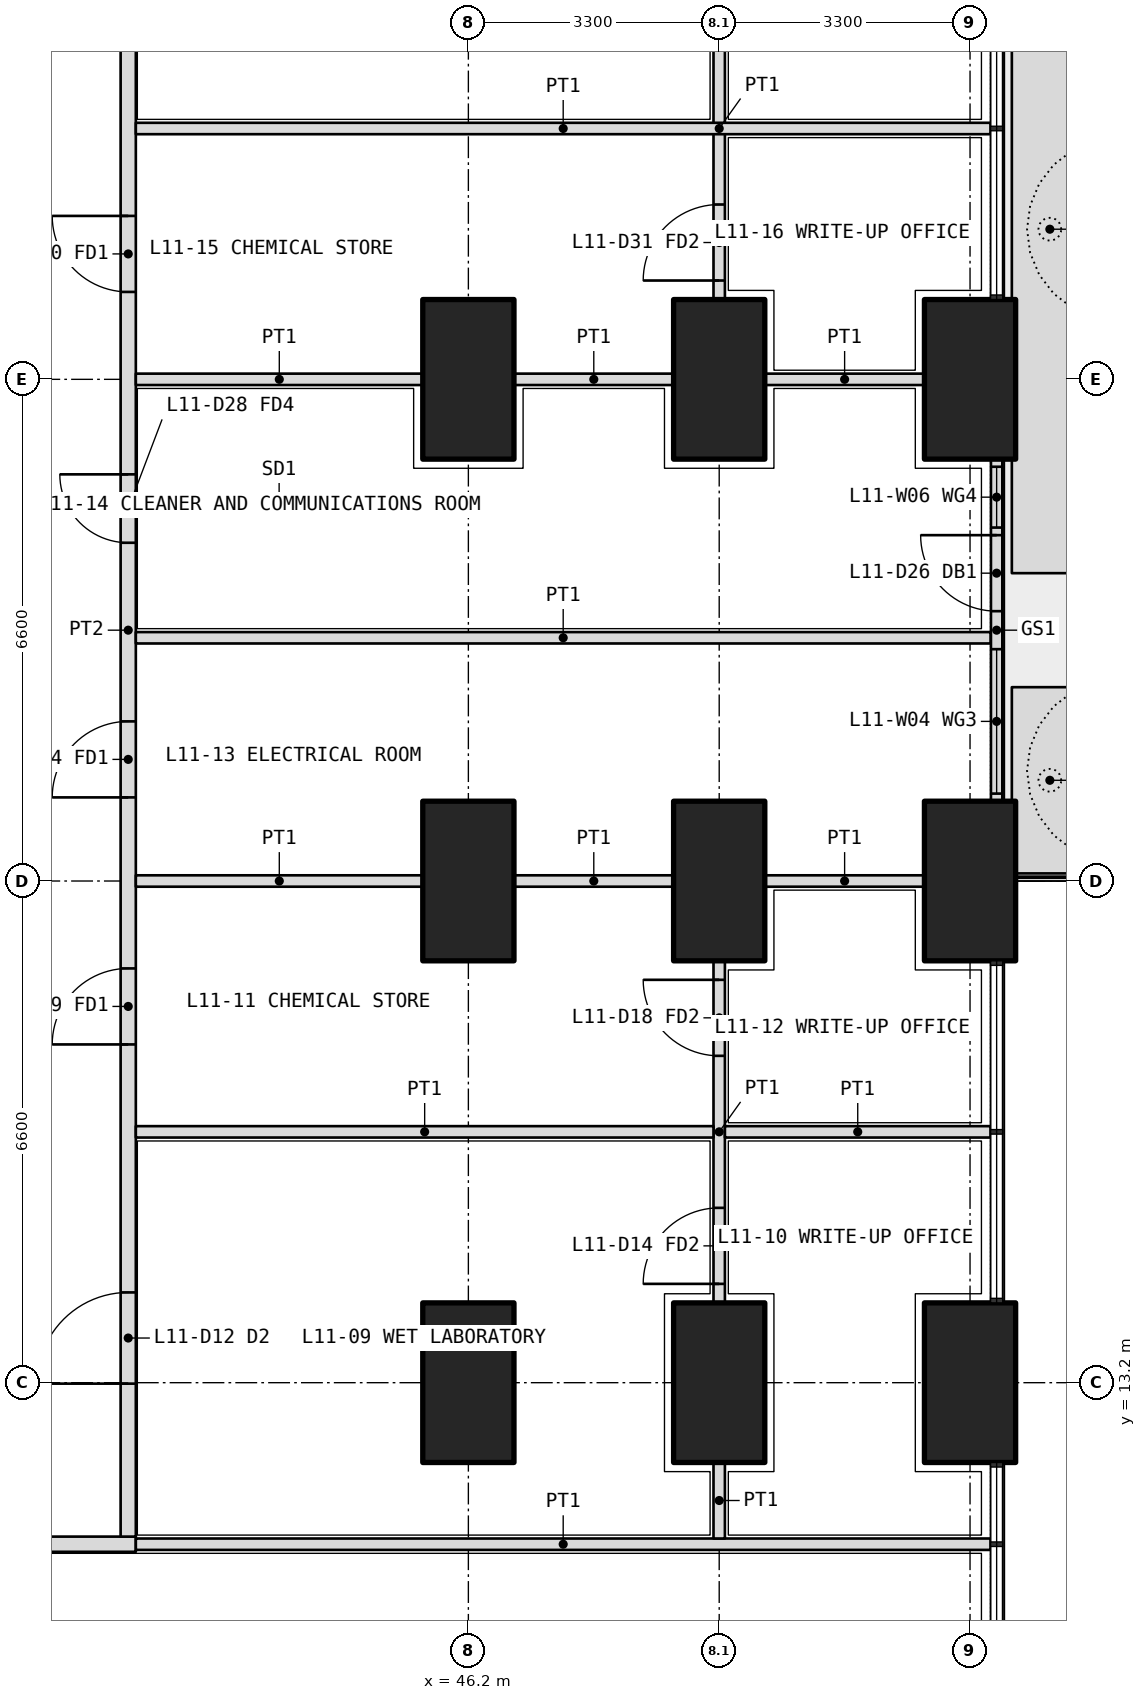
"""IFC4 building model, lengths in metres.
Left out: names, types, materials, properties, quantities, classifications, styles, units other than length and angle.
Written with IfcOpenShell. Run it as: python <this file> out.ifc"""

import sys

from ifc_helpers import new_model, si_unit, direction, frame, frame_2d, origin, origin_2d, place, context, subcontext, project, spatial, polyline, rectangle, outline, extrude, element, fill, save


model = new_model("IFC4")
c1 = context("Model", 3, precision=1e-05, world=origin(), true_north=direction((0.0, 1.0)))
c2 = subcontext(c1, "Body", "Model", "MODEL_VIEW")
j1 = project(units=[si_unit("LENGTHUNIT", "METRE"), si_unit("PLANEANGLEUNIT", "RADIAN")], contexts=[c1])
p1 = place(None, origin())
s1 = spatial("IfcSite", under=j1, at=p1, CompositionType="ELEMENT")
p2 = place(p1, origin())
s2 = spatial("IfcBuilding", under=s1, at=p2, CompositionType="ELEMENT")
p3 = place(p2, frame((0.0, 0.0, 50.7)))
s3 = spatial("IfcBuildingStorey", under=s2, at=p3, CompositionType="ELEMENT", Elevation=50.7)
for number, where, z_axis, x_axis in (
    (1, (52.8, 13.2, 0.0), (0.0, 0.0, 1.0), (0.0, 1.0, 0.0)),
    (2, (52.8, 19.8, 0.0), (0.0, 0.0, 1.0), (0.0, 1.0, 0.0)),
    (3, (52.8, 26.4, 0.0), (0.0, 0.0, 1.0), (0.0, 1.0, 0.0)),
    (4, (49.5, 13.2, 0.0), (0.0, 0.0, 1.0), (0.0, 1.0, 0.0)),
    (5, (49.5, 19.8, 0.0), (0.0, 0.0, 1.0), (0.0, 1.0, 0.0)),
    (6, (49.5, 26.4, 0.0), (0.0, 0.0, 1.0), (0.0, 1.0, 0.0)),
    (7, (46.2, 13.2, 0.0), (0.0, 0.0, 1.0), (0.0, 1.0, 0.0)),
    (8, (46.2, 19.8, 0.0), (0.0, 0.0, 1.0), (0.0, 1.0, 0.0)),
    (9, (46.2, 26.4, 0.0), (0.0, 0.0, 1.0), (0.0, 1.0, 0.0)),
):
    element("IfcColumn", number, at=place(p3, frame(where, z_axis=z_axis, x_axis=x_axis)), inside=s3, PredefinedType="COLUMN", context=c2, shape_type="SweptSolid", body=[
        extrude(rectangle(XDim=2.1, YDim=1.2, at=origin_2d()), origin(), (0.0, 0.0, 1.0), 4.2),
    ])
p4 = place(p3, origin())
e10 = element("IfcWall", 10, at=p4, inside=s3, PredefinedType="USERDEFINED", context=c2, shape_type="SweptSolid", body=[
    extrude(outline(polyline([(53.35, 19.9), (54.35, 19.9), (54.35, 22.35), (53.35, 22.35), (53.35, 19.9)]), holes=[polyline([(53.5, 20.05), (54.2, 20.05), (54.2, 22.2), (53.5, 22.2), (53.5, 20.05)])]), origin(), (0.0, 0.0, 1.0), 1.05),
])
p5 = place(p3, origin())
e11 = element("IfcWall", 11, at=p5, inside=s3, PredefinedType="USERDEFINED", context=c2, shape_type="SweptSolid", body=[
    extrude(outline(polyline([(53.35, 23.85), (54.35, 23.85), (54.35, 32.9), (53.35, 32.9), (53.35, 23.85)]), holes=[polyline([(53.5, 24.0), (54.2, 24.0), (54.2, 32.75), (53.5, 32.75), (53.5, 24.0)])]), origin(), (0.0, 0.0, 1.0), 1.05),
])
p6 = place(p3, frame((53.15, 20.85, 0.0), z_axis=(0.0, 0.0, 1.0), x_axis=(0.0, 1.0, 0.0)))
e12 = element("IfcWall", 12, at=p6, inside=s3, PredefinedType="SOLIDWALL", context=c2, shape_type="SweptSolid", body=[
    extrude(rectangle(XDim=4.5, YDim=0.15, at=frame_2d((2.25, 0.0))), origin(), (0.0, 0.0, 1.0), 2.7),
])
p7 = place(p6, frame((2.5, 0.0, 0.0)))
e13 = element("IfcOpeningElement", 13, at=p7, cuts=e12, PredefinedType="OPENING", context=c2, shape_type="SweptSolid", body=[
    extrude(rectangle(XDim=1.0, YDim=2.4, at=frame_2d((0.5, 1.2))), frame((0.0, 0.085, 0.0), z_axis=(0.0, -1.0, 0.0), x_axis=(1.0, 0.0, 0.0)), (0.0, 0.0, 1.0), 0.17),
])
p8 = place(p6, frame((0.1, 0.0, 0.1)))
e14 = element("IfcOpeningElement", 14, at=p8, cuts=e12, PredefinedType="OPENING", context=c2, shape_type="SweptSolid", body=[
    extrude(rectangle(XDim=1.9, YDim=2.3, at=frame_2d((0.95, 1.15))), frame((0.0, 0.085, 0.0), z_axis=(0.0, -1.0, 0.0), x_axis=(1.0, 0.0, 0.0)), (0.0, 0.0, 1.0), 0.17),
])
p9 = place(p6, frame((3.6, 0.0, 0.1)))
e15 = element("IfcOpeningElement", 15, at=p9, cuts=e12, PredefinedType="OPENING", context=c2, shape_type="SweptSolid", body=[
    extrude(rectangle(XDim=0.8, YDim=2.3, at=frame_2d((0.4, 1.15))), frame((0.0, 0.085, 0.0), z_axis=(0.0, -1.0, 0.0), x_axis=(1.0, 0.0, 0.0)), (0.0, 0.0, 1.0), 0.17),
])
p10 = place(p3, frame((26.4, 11.075, 0.0), z_axis=(0.0, 0.0, 1.0), x_axis=(1.0, 0.0, 0.0)))
e16 = element("IfcWall", 16, at=p10, inside=s3, PredefinedType="PARTITIONING", context=c2, shape_type="SweptSolid", body=[
    extrude(rectangle(XDim=15.425, YDim=0.2, at=frame_2d((7.712, 0.0))), origin(), (0.0, 0.0, 1.0), 2.85),
])
p11 = place(p10, frame((1.6, 0.0, 0.0)))
e17 = element("IfcOpeningElement", 17, at=p11, cuts=e16, PredefinedType="OPENING", context=c2, shape_type="SweptSolid", body=[
    extrude(rectangle(XDim=1.0, YDim=2.1, at=frame_2d((0.5, 1.05))), frame((0.0, 0.11, 0.0), z_axis=(0.0, -1.0, 0.0), x_axis=(1.0, 0.0, 0.0)), (0.0, 0.0, 1.0), 0.22),
])
p12 = place(p10, frame((4.9, 0.0, 0.0)))
e18 = element("IfcOpeningElement", 18, at=p12, cuts=e16, PredefinedType="OPENING", context=c2, shape_type="SweptSolid", body=[
    extrude(rectangle(XDim=1.0, YDim=2.1, at=frame_2d((0.5, 1.05))), frame((0.0, 0.11, 0.0), z_axis=(0.0, -1.0, 0.0), x_axis=(1.0, 0.0, 0.0)), (0.0, 0.0, 1.0), 0.22),
])
p13 = place(p10, frame((10.363, 0.0, 0.0)))
e19 = element("IfcOpeningElement", 19, at=p13, cuts=e16, PredefinedType="OPENING", context=c2, shape_type="SweptSolid", body=[
    extrude(rectangle(XDim=1.2, YDim=2.1, at=frame_2d((0.6, 1.05))), frame((0.0, 0.11, 0.0), z_axis=(0.0, -1.0, 0.0), x_axis=(1.0, 0.0, 0.0)), (0.0, 0.0, 1.0), 0.22),
])
p14 = place(p3, frame((41.725, 11.175, 0.0), z_axis=(0.0, 0.0, 1.0), x_axis=(0.0, 1.0, 0.0)))
e20 = element("IfcWall", 20, at=p14, inside=s3, PredefinedType="PARTITIONING", context=c2, shape_type="SweptSolid", body=[
    extrude(rectangle(XDim=23.85, YDim=0.2, at=frame_2d((11.925, 0.0))), origin(), (0.0, 0.0, 1.0), 2.85),
])
p15 = place(p14, frame((2.012, 0.0, 0.0)))
e21 = element("IfcOpeningElement", 21, at=p15, cuts=e20, PredefinedType="OPENING", context=c2, shape_type="SweptSolid", body=[
    extrude(rectangle(XDim=1.2, YDim=2.1, at=frame_2d((0.6, 1.05))), frame((0.0, 0.11, 0.0), z_axis=(0.0, -1.0, 0.0), x_axis=(1.0, 0.0, 0.0)), (0.0, 0.0, 1.0), 0.22),
])
p16 = place(p14, frame((6.475, 0.0, 0.0)))
e22 = element("IfcOpeningElement", 22, at=p16, cuts=e20, PredefinedType="OPENING", context=c2, shape_type="SweptSolid", body=[
    extrude(rectangle(XDim=1.0, YDim=2.1, at=frame_2d((0.5, 1.05))), frame((0.0, 0.11, 0.0), z_axis=(0.0, -1.0, 0.0), x_axis=(1.0, 0.0, 0.0)), (0.0, 0.0, 1.0), 0.22),
])
p17 = place(p14, frame((9.725, 0.0, 0.0)))
e23 = element("IfcOpeningElement", 23, at=p17, cuts=e20, PredefinedType="OPENING", context=c2, shape_type="SweptSolid", body=[
    extrude(rectangle(XDim=1.0, YDim=2.1, at=frame_2d((0.5, 1.05))), frame((0.0, 0.11, 0.0), z_axis=(0.0, -1.0, 0.0), x_axis=(1.0, 0.0, 0.0)), (0.0, 0.0, 1.0), 0.22),
])
p18 = place(p14, frame((13.075, 0.0, 0.0)))
e24 = element("IfcOpeningElement", 24, at=p18, cuts=e20, PredefinedType="OPENING", context=c2, shape_type="SweptSolid", body=[
    extrude(rectangle(XDim=0.9, YDim=2.1, at=frame_2d((0.45, 1.05))), frame((0.0, 0.11, 0.0), z_axis=(0.0, -1.0, 0.0), x_axis=(1.0, 0.0, 0.0)), (0.0, 0.0, 1.0), 0.22),
])
p19 = place(p14, frame((16.375, 0.0, 0.0)))
e25 = element("IfcOpeningElement", 25, at=p19, cuts=e20, PredefinedType="OPENING", context=c2, shape_type="SweptSolid", body=[
    extrude(rectangle(XDim=1.0, YDim=2.1, at=frame_2d((0.5, 1.05))), frame((0.0, 0.11, 0.0), z_axis=(0.0, -1.0, 0.0), x_axis=(1.0, 0.0, 0.0)), (0.0, 0.0, 1.0), 0.22),
])
p20 = place(p14, frame((20.738, 0.0, 0.0)))
e26 = element("IfcOpeningElement", 26, at=p20, cuts=e20, PredefinedType="OPENING", context=c2, shape_type="SweptSolid", body=[
    extrude(rectangle(XDim=1.0, YDim=2.1, at=frame_2d((0.5, 1.05))), frame((0.0, 0.11, 0.0), z_axis=(0.0, -1.0, 0.0), x_axis=(1.0, 0.0, 0.0)), (0.0, 0.0, 1.0), 0.22),
])
p21 = place(p3, frame((53.07, 11.075, 0.0), z_axis=(0.0, 0.0, 1.0), x_axis=(-1.0, 0.0, 0.0)))
e27 = element("IfcWall", 27, at=p21, inside=s3, PredefinedType="PARTITIONING", context=c2, shape_type="SweptSolid", body=[
    extrude(rectangle(XDim=11.245, YDim=0.15, at=frame_2d((5.623, 0.0))), origin(), (0.0, 0.0, 1.0), 2.7),
])
p22 = place(p3, frame((49.5, 11.15, 0.0), z_axis=(0.0, 0.0, 1.0), x_axis=(0.0, 1.0, 0.0)))
e28 = element("IfcWall", 28, at=p22, inside=s3, PredefinedType="PARTITIONING", context=c2, shape_type="SweptSolid", body=[
    extrude(rectangle(XDim=1.0, YDim=0.15, at=frame_2d((0.5, 0.0))), origin(), (0.0, 0.0, 1.0), 3.9),
])
p23 = place(p3, frame((49.5, 14.25, 0.0), z_axis=(0.0, 0.0, 1.0), x_axis=(0.0, 1.0, 0.0)))
e29 = element("IfcWall", 29, at=p23, inside=s3, PredefinedType="PARTITIONING", context=c2, shape_type="SweptSolid", body=[
    extrude(rectangle(XDim=4.5, YDim=0.15, at=frame_2d((2.25, 0.0))), origin(), (0.0, 0.0, 1.0), 3.9),
])
p24 = place(p23, frame((0.25, 0.0, 0.0)))
e30 = element("IfcOpeningElement", 30, at=p24, cuts=e29, PredefinedType="OPENING", context=c2, shape_type="SweptSolid", body=[
    extrude(rectangle(XDim=1.0, YDim=2.1, at=frame_2d((0.5, 1.05))), frame((0.0, 0.085, 0.0), z_axis=(0.0, -1.0, 0.0), x_axis=(1.0, 0.0, 0.0)), (0.0, 0.0, 1.0), 0.17),
])
p25 = place(p23, frame((3.25, 0.0, 0.0)))
e31 = element("IfcOpeningElement", 31, at=p25, cuts=e29, PredefinedType="OPENING", context=c2, shape_type="SweptSolid", body=[
    extrude(rectangle(XDim=1.0, YDim=2.1, at=frame_2d((0.5, 1.05))), frame((0.0, 0.085, 0.0), z_axis=(0.0, -1.0, 0.0), x_axis=(1.0, 0.0, 0.0)), (0.0, 0.0, 1.0), 0.17),
])
p26 = place(p3, frame((49.5, 27.45, 0.0), z_axis=(0.0, 0.0, 1.0), x_axis=(0.0, 1.0, 0.0)))
e32 = element("IfcWall", 32, at=p26, inside=s3, PredefinedType="PARTITIONING", context=c2, shape_type="SweptSolid", body=[
    extrude(rectangle(XDim=4.5, YDim=0.15, at=frame_2d((2.25, 0.0))), origin(), (0.0, 0.0, 1.0), 3.9),
])
p27 = place(p26, frame((0.25, 0.0, 0.0)))
e33 = element("IfcOpeningElement", 33, at=p27, cuts=e32, PredefinedType="OPENING", context=c2, shape_type="SweptSolid", body=[
    extrude(rectangle(XDim=1.0, YDim=2.1, at=frame_2d((0.5, 1.05))), frame((0.0, 0.085, 0.0), z_axis=(0.0, -1.0, 0.0), x_axis=(1.0, 0.0, 0.0)), (0.0, 0.0, 1.0), 0.17),
])
p28 = place(p3, frame((53.07, 23.0, 0.0), z_axis=(0.0, 0.0, 1.0), x_axis=(-1.0, 0.0, 0.0)))
e34 = element("IfcWall", 34, at=p28, inside=s3, PredefinedType="PARTITIONING", context=c2, shape_type="SweptSolid", body=[
    extrude(rectangle(XDim=11.245, YDim=0.15, at=frame_2d((5.623, 0.0))), origin(), (0.0, 0.0, 1.0), 2.7),
])
for number, where, z_axis, x_axis in (
    (35, (52.2, 26.4, 0.0), (0.0, 0.0, 1.0), (-1.0, 0.0, 0.0)),
    (36, (48.9, 26.4, 0.0), (0.0, 0.0, 1.0), (-1.0, 0.0, 0.0)),
):
    element("IfcWall", number, at=place(p3, frame(where, z_axis=z_axis, x_axis=x_axis)), inside=s3, PredefinedType="PARTITIONING", context=c2, shape_type="SweptSolid", body=[
        extrude(rectangle(XDim=2.1, YDim=0.15, at=frame_2d((1.05, 0.0))), origin(), (0.0, 0.0, 1.0), 2.85),
    ])
p29 = place(p3, frame((45.6, 26.4, 0.0), z_axis=(0.0, 0.0, 1.0), x_axis=(-1.0, 0.0, 0.0)))
e37 = element("IfcWall", 37, at=p29, inside=s3, PredefinedType="PARTITIONING", context=c2, shape_type="SweptSolid", body=[
    extrude(rectangle(XDim=3.775, YDim=0.15, at=frame_2d((1.888, 0.0))), origin(), (0.0, 0.0, 1.0), 2.85),
])
p30 = place(p3, frame((53.07, 16.5, 0.0), z_axis=(0.0, 0.0, 1.0), x_axis=(-1.0, 0.0, 0.0)))
e38 = element("IfcWall", 38, at=p30, inside=s3, PredefinedType="PARTITIONING", context=c2, shape_type="SweptSolid", body=[
    extrude(rectangle(XDim=3.495, YDim=0.15, at=frame_2d((1.748, 0.0))), origin(), (0.0, 0.0, 1.0), 2.7),
])
p31 = place(p3, frame((49.425, 16.5, 0.0), z_axis=(0.0, 0.0, 1.0), x_axis=(-1.0, 0.0, 0.0)))
e39 = element("IfcWall", 39, at=p31, inside=s3, PredefinedType="PARTITIONING", context=c2, shape_type="SweptSolid", body=[
    extrude(rectangle(XDim=7.6, YDim=0.15, at=frame_2d((3.8, 0.0))), origin(), (0.0, 0.0, 1.0), 3.9),
])
for number, where, z_axis, x_axis in (
    (40, (52.2, 19.8, 0.0), (0.0, 0.0, 1.0), (-1.0, 0.0, 0.0)),
    (41, (48.9, 19.8, 0.0), (0.0, 0.0, 1.0), (-1.0, 0.0, 0.0)),
):
    element("IfcWall", number, at=place(p3, frame(where, z_axis=z_axis, x_axis=x_axis)), inside=s3, PredefinedType="PARTITIONING", context=c2, shape_type="SweptSolid", body=[
        extrude(rectangle(XDim=2.1, YDim=0.15, at=frame_2d((1.05, 0.0))), origin(), (0.0, 0.0, 1.0), 2.85),
    ])
p32 = place(p3, frame((45.6, 19.8, 0.0), z_axis=(0.0, 0.0, 1.0), x_axis=(-1.0, 0.0, 0.0)))
e42 = element("IfcWall", 42, at=p32, inside=s3, PredefinedType="PARTITIONING", context=c2, shape_type="SweptSolid", body=[
    extrude(rectangle(XDim=3.775, YDim=0.15, at=frame_2d((1.888, 0.0))), origin(), (0.0, 0.0, 1.0), 2.85),
])
p33 = place(p3, frame((53.07, 29.7, 0.0), z_axis=(0.0, 0.0, 1.0), x_axis=(-1.0, 0.0, 0.0)))
e43 = element("IfcWall", 43, at=p33, inside=s3, PredefinedType="PARTITIONING", context=c2, shape_type="SweptSolid", body=[
    extrude(rectangle(XDim=11.245, YDim=0.15, at=frame_2d((5.623, 0.0))), origin(), (0.0, 0.0, 1.0), 2.7),
])
p34 = place(p7, origin())
e44 = element("IfcDoor", 44, at=p34, inside=s3, OperationType="SINGLE_SWING_RIGHT", PredefinedType="DOOR", context=c2, shape_type="SweptSolid", body=[
    extrude(rectangle(XDim=1.0, YDim=2.4, at=frame_2d((0.5, 1.2))), frame((0.0, 0.025, 0.0), z_axis=(0.0, -1.0, 0.0), x_axis=(1.0, 0.0, 0.0)), (0.0, 0.0, 1.0), 0.05),
])
fill(e13, e44)
p35 = place(p8, origin())
e45 = element("IfcWindow", 45, at=p35, inside=s3, PartitioningType="SINGLE_PANEL", PredefinedType="WINDOW", context=c2, shape_type="SweptSolid", body=[
    extrude(rectangle(XDim=1.9, YDim=2.3, at=frame_2d((0.95, 1.15))), frame((0.0, 0.03, 0.0), z_axis=(0.0, -1.0, 0.0), x_axis=(1.0, 0.0, 0.0)), (0.0, 0.0, 1.0), 0.06),
])
fill(e14, e45)
p36 = place(p9, origin())
e46 = element("IfcWindow", 46, at=p36, inside=s3, PartitioningType="SINGLE_PANEL", PredefinedType="WINDOW", context=c2, shape_type="SweptSolid", body=[
    extrude(rectangle(XDim=0.8, YDim=2.3, at=frame_2d((0.4, 1.15))), frame((0.0, 0.03, 0.0), z_axis=(0.0, -1.0, 0.0), x_axis=(1.0, 0.0, 0.0)), (0.0, 0.0, 1.0), 0.06),
])
fill(e15, e46)
p37 = place(p15, origin())
e47 = element("IfcDoor", 47, at=p37, inside=s3, OperationType="DOUBLE_DOOR_SINGLE_SWING", PredefinedType="DOOR", context=c2, shape_type="SweptSolid", body=[
    extrude(rectangle(XDim=1.2, YDim=2.1, at=frame_2d((0.6, 1.05))), frame((0.0, 0.025, 0.0), z_axis=(0.0, -1.0, 0.0), x_axis=(1.0, 0.0, 0.0)), (0.0, 0.0, 1.0), 0.05),
])
fill(e21, e47)
p38 = place(p24, origin())
e48 = element("IfcDoor", 48, at=p38, inside=s3, OperationType="SINGLE_SWING_LEFT", PredefinedType="DOOR", context=c2, shape_type="SweptSolid", body=[
    extrude(rectangle(XDim=1.0, YDim=2.1, at=frame_2d((0.5, 1.05))), frame((0.0, 0.025, 0.0), z_axis=(0.0, -1.0, 0.0), x_axis=(1.0, 0.0, 0.0)), (0.0, 0.0, 1.0), 0.05),
])
fill(e30, e48)
p39 = place(p16, origin())
e49 = element("IfcDoor", 49, at=p39, inside=s3, OperationType="SINGLE_SWING_LEFT", PredefinedType="DOOR", context=c2, shape_type="SweptSolid", body=[
    extrude(rectangle(XDim=1.0, YDim=2.1, at=frame_2d((0.5, 1.05))), frame((0.0, 0.025, 0.0), z_axis=(0.0, -1.0, 0.0), x_axis=(1.0, 0.0, 0.0)), (0.0, 0.0, 1.0), 0.05),
])
fill(e22, e49)
p40 = place(p25, origin())
e50 = element("IfcDoor", 50, at=p40, inside=s3, OperationType="SINGLE_SWING_RIGHT", PredefinedType="DOOR", context=c2, shape_type="SweptSolid", body=[
    extrude(rectangle(XDim=1.0, YDim=2.1, at=frame_2d((0.5, 1.05))), frame((0.0, 0.025, 0.0), z_axis=(0.0, -1.0, 0.0), x_axis=(1.0, 0.0, 0.0)), (0.0, 0.0, 1.0), 0.05),
])
fill(e31, e50)
p41 = place(p17, origin())
e51 = element("IfcDoor", 51, at=p41, inside=s3, OperationType="SINGLE_SWING_LEFT", PredefinedType="DOOR", context=c2, shape_type="SweptSolid", body=[
    extrude(rectangle(XDim=1.0, YDim=2.1, at=frame_2d((0.5, 1.05))), frame((0.0, 0.025, 0.0), z_axis=(0.0, -1.0, 0.0), x_axis=(1.0, 0.0, 0.0)), (0.0, 0.0, 1.0), 0.05),
])
fill(e23, e51)
p42 = place(p18, origin())
e52 = element("IfcDoor", 52, at=p42, inside=s3, OperationType="SINGLE_SWING_RIGHT", PredefinedType="DOOR", context=c2, shape_type="SweptSolid", body=[
    extrude(rectangle(XDim=0.9, YDim=2.1, at=frame_2d((0.45, 1.05))), frame((0.0, 0.025, 0.0), z_axis=(0.0, -1.0, 0.0), x_axis=(1.0, 0.0, 0.0)), (0.0, 0.0, 1.0), 0.05),
])
fill(e24, e52)
p43 = place(p19, origin())
e53 = element("IfcDoor", 53, at=p43, inside=s3, OperationType="SINGLE_SWING_RIGHT", PredefinedType="DOOR", context=c2, shape_type="SweptSolid", body=[
    extrude(rectangle(XDim=1.0, YDim=2.1, at=frame_2d((0.5, 1.05))), frame((0.0, 0.025, 0.0), z_axis=(0.0, -1.0, 0.0), x_axis=(1.0, 0.0, 0.0)), (0.0, 0.0, 1.0), 0.05),
])
fill(e25, e53)
p44 = place(p27, origin())
e54 = element("IfcDoor", 54, at=p44, inside=s3, OperationType="SINGLE_SWING_LEFT", PredefinedType="DOOR", context=c2, shape_type="SweptSolid", body=[
    extrude(rectangle(XDim=1.0, YDim=2.1, at=frame_2d((0.5, 1.05))), frame((0.0, 0.025, 0.0), z_axis=(0.0, -1.0, 0.0), x_axis=(1.0, 0.0, 0.0)), (0.0, 0.0, 1.0), 0.05),
])
fill(e33, e54)
save(model, sys.argv[1])
